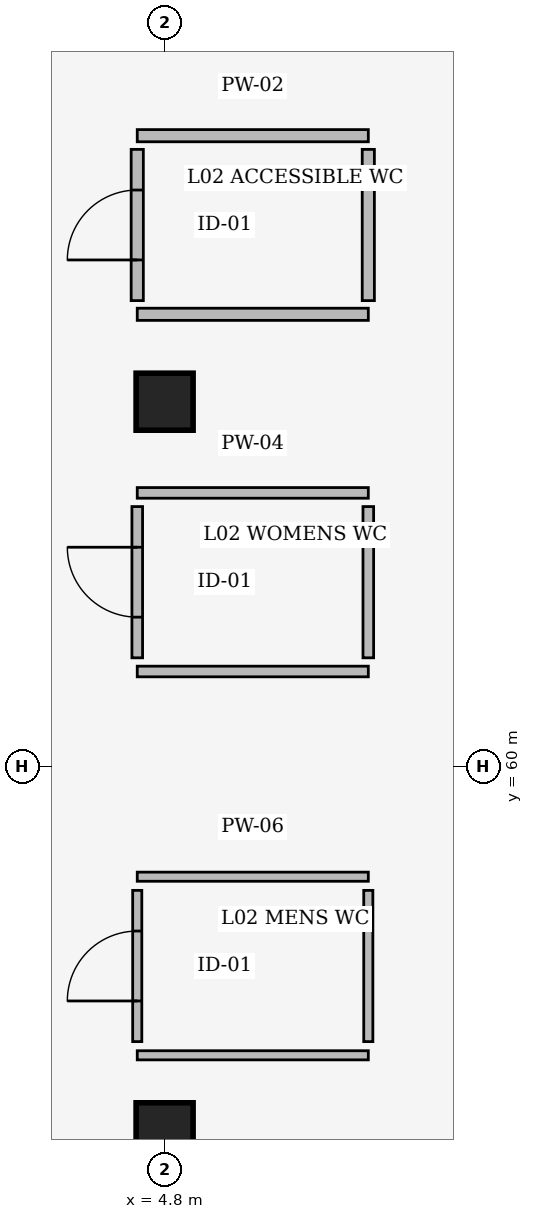
"""IFC4 building model, lengths in metres.
Left out: names, types, materials, properties, quantities, classifications, styles, units other than length and angle.
Written with IfcOpenShell. Run it as: python <this file> out.ifc"""

import sys

from ifc_helpers import new_model, si_unit, direction, frame, frame_2d, origin, origin_2d, place, context, subcontext, project, spatial, rectangle, extrude, element, fill, save


model = new_model("IFC4")
c1 = context("Model", 3, precision=1e-05, world=origin(), true_north=direction((0.0, 1.0)))
c2 = subcontext(c1, "Body", "Model", "MODEL_VIEW")
j1 = project(units=[si_unit("LENGTHUNIT", "METRE"), si_unit("PLANEANGLEUNIT", "RADIAN")], contexts=[c1])
p1 = place(None, origin())
s1 = spatial("IfcSite", under=j1, at=p1, CompositionType="ELEMENT")
p2 = place(p1, origin())
s2 = spatial("IfcBuilding", under=s1, at=p2, CompositionType="ELEMENT")
p3 = place(p2, frame((0.0, 0.0, 10.5)))
s3 = spatial("IfcBuildingStorey", under=s2, at=p3, CompositionType="ELEMENT", Elevation=10.5)
for number, where, z_axis, x_axis in (
    (1, (4.8, 55.2, 0.0), (0.0, 0.0, 1.0), (1.0, 0.0, 0.0)),
    (2, (4.8, 64.8, 0.0), (0.0, 0.0, 1.0), (1.0, 0.0, 0.0)),
):
    element("IfcColumn", number, at=place(p3, frame(where, z_axis=z_axis, x_axis=x_axis)), inside=s3, PredefinedType="COLUMN", context=c2, shape_type="SweptSolid", body=[
        extrude(rectangle(XDim=0.75, YDim=0.75, at=origin_2d()), origin(), (0.0, 0.0, 1.0), 4.8),
    ])
for number, where, z_axis, x_axis in (
    (3, (4.44, 58.55, 0.0), (0.0, 0.0, 1.0), (1.0, 0.0, 0.0)),
    (4, (4.44, 56.2, 0.0), (0.0, 0.0, 1.0), (1.0, 0.0, 0.0)),
):
    element("IfcWall", number, at=place(p3, frame(where, z_axis=z_axis, x_axis=x_axis)), inside=s3, PredefinedType="PARTITIONING", context=c2, shape_type="SweptSolid", body=[
        extrude(rectangle(XDim=3.04, YDim=0.12, at=frame_2d((1.52, 0.0))), origin(), (0.0, 0.0, 1.0), 3.897),
    ])
p4 = place(p3, frame((4.44, 56.38, 0.0), z_axis=(0.0, 0.0, 1.0), x_axis=(0.0, 1.0, 0.0)))
e5 = element("IfcWall", 5, at=p4, inside=s3, PredefinedType="PARTITIONING", context=c2, shape_type="SweptSolid", body=[
    extrude(rectangle(XDim=1.99, YDim=0.12, at=frame_2d((0.995, 0.0))), origin(), (0.0, 0.0, 1.0), 3.897),
])
p5 = place(p4, frame((0.535, 0.0, 0.0)))
e6 = element("IfcOpeningElement", 6, at=p5, cuts=e5, PredefinedType="OPENING", context=c2, shape_type="SweptSolid", body=[
    extrude(rectangle(XDim=0.92, YDim=2.12, at=frame_2d((0.46, 1.06))), frame((0.0, 0.07, 0.0), z_axis=(0.0, -1.0, 0.0), x_axis=(1.0, 0.0, 0.0)), (0.0, 0.0, 1.0), 0.14),
])
p6 = place(p3, frame((7.48, 56.38, 0.0), z_axis=(0.0, 0.0, 1.0), x_axis=(0.0, 1.0, 0.0)))
e7 = element("IfcWall", 7, at=p6, inside=s3, PredefinedType="PARTITIONING", context=c2, shape_type="SweptSolid", body=[
    extrude(rectangle(XDim=1.99, YDim=0.12, at=frame_2d((0.995, 0.0))), origin(), (0.0, 0.0, 1.0), 4.44),
])
for number, where, z_axis, x_axis in (
    (8, (4.44, 63.6, 0.0), (0.0, 0.0, 1.0), (1.0, 0.0, 0.0)),
    (9, (4.44, 61.25, 0.0), (0.0, 0.0, 1.0), (1.0, 0.0, 0.0)),
):
    element("IfcWall", number, at=place(p3, frame(where, z_axis=z_axis, x_axis=x_axis)), inside=s3, PredefinedType="PARTITIONING", context=c2, shape_type="SweptSolid", body=[
        extrude(rectangle(XDim=3.04, YDim=0.14, at=frame_2d((1.52, 0.0))), origin(), (0.0, 0.0, 1.0), 3.897),
    ])
p7 = place(p3, frame((4.44, 61.43, 0.0), z_axis=(0.0, 0.0, 1.0), x_axis=(0.0, 1.0, 0.0)))
e10 = element("IfcWall", 10, at=p7, inside=s3, PredefinedType="PARTITIONING", context=c2, shape_type="SweptSolid", body=[
    extrude(rectangle(XDim=1.99, YDim=0.14, at=frame_2d((0.995, 0.0))), origin(), (0.0, 0.0, 1.0), 3.897),
])
p8 = place(p7, frame((0.535, 0.0, 0.0)))
e11 = element("IfcOpeningElement", 11, at=p8, cuts=e10, PredefinedType="OPENING", context=c2, shape_type="SweptSolid", body=[
    extrude(rectangle(XDim=0.92, YDim=2.12, at=frame_2d((0.46, 1.06))), frame((0.0, 0.08, 0.0), z_axis=(0.0, -1.0, 0.0), x_axis=(1.0, 0.0, 0.0)), (0.0, 0.0, 1.0), 0.16),
])
p9 = place(p3, frame((7.48, 61.43, 0.0), z_axis=(0.0, 0.0, 1.0), x_axis=(0.0, 1.0, 0.0)))
e12 = element("IfcWall", 12, at=p9, inside=s3, PredefinedType="PARTITIONING", context=c2, shape_type="SweptSolid", body=[
    extrude(rectangle(XDim=1.99, YDim=0.14, at=frame_2d((0.995, 0.0))), origin(), (0.0, 0.0, 1.0), 4.44),
])
for number, where, z_axis, x_axis in (
    (13, (4.44, 68.3, 0.0), (0.0, 0.0, 1.0), (1.0, 0.0, 0.0)),
    (14, (4.44, 65.95, 0.0), (0.0, 0.0, 1.0), (1.0, 0.0, 0.0)),
):
    element("IfcWall", number, at=place(p3, frame(where, z_axis=z_axis, x_axis=x_axis)), inside=s3, PredefinedType="PARTITIONING", context=c2, shape_type="SweptSolid", body=[
        extrude(rectangle(XDim=3.04, YDim=0.16, at=frame_2d((1.52, 0.0))), origin(), (0.0, 0.0, 1.0), 3.755),
    ])
p10 = place(p3, frame((4.44, 66.13, 0.0), z_axis=(0.0, 0.0, 1.0), x_axis=(0.0, 1.0, 0.0)))
e15 = element("IfcWall", 15, at=p10, inside=s3, PredefinedType="PARTITIONING", context=c2, shape_type="SweptSolid", body=[
    extrude(rectangle(XDim=1.99, YDim=0.16, at=frame_2d((0.995, 0.0))), origin(), (0.0, 0.0, 1.0), 3.755),
])
p11 = place(p10, frame((0.535, 0.0, 0.0)))
e16 = element("IfcOpeningElement", 16, at=p11, cuts=e15, PredefinedType="OPENING", context=c2, shape_type="SweptSolid", body=[
    extrude(rectangle(XDim=0.92, YDim=2.12, at=frame_2d((0.46, 1.06))), frame((0.0, 0.09, 0.0), z_axis=(0.0, -1.0, 0.0), x_axis=(1.0, 0.0, 0.0)), (0.0, 0.0, 1.0), 0.18),
])
p12 = place(p3, frame((7.48, 66.13, 0.0), z_axis=(0.0, 0.0, 1.0), x_axis=(0.0, 1.0, 0.0)))
e17 = element("IfcWall", 17, at=p12, inside=s3, PredefinedType="PARTITIONING", context=c2, shape_type="SweptSolid", body=[
    extrude(rectangle(XDim=1.99, YDim=0.16, at=frame_2d((0.995, 0.0))), origin(), (0.0, 0.0, 1.0), 4.44),
])
p13 = place(p5, origin())
e18 = element("IfcDoor", 18, at=p13, inside=s3, OperationType="SINGLE_SWING_LEFT", PredefinedType="DOOR", context=c2, shape_type="SweptSolid", body=[
    extrude(rectangle(XDim=0.92, YDim=2.12, at=frame_2d((0.46, 1.06))), frame((0.0, 0.025, 0.0), z_axis=(0.0, -1.0, 0.0), x_axis=(1.0, 0.0, 0.0)), (0.0, 0.0, 1.0), 0.05),
])
fill(e6, e18)
p14 = place(p8, origin())
e19 = element("IfcDoor", 19, at=p14, inside=s3, OperationType="SINGLE_SWING_RIGHT", PredefinedType="DOOR", context=c2, shape_type="SweptSolid", body=[
    extrude(rectangle(XDim=0.92, YDim=2.12, at=frame_2d((0.46, 1.06))), frame((0.0, 0.025, 0.0), z_axis=(0.0, -1.0, 0.0), x_axis=(1.0, 0.0, 0.0)), (0.0, 0.0, 1.0), 0.05),
])
fill(e11, e19)
p15 = place(p11, origin())
e20 = element("IfcDoor", 20, at=p15, inside=s3, OperationType="SINGLE_SWING_LEFT", PredefinedType="DOOR", context=c2, shape_type="SweptSolid", body=[
    extrude(rectangle(XDim=0.92, YDim=2.12, at=frame_2d((0.46, 1.06))), frame((0.0, 0.025, 0.0), z_axis=(0.0, -1.0, 0.0), x_axis=(1.0, 0.0, 0.0)), (0.0, 0.0, 1.0), 0.05),
])
fill(e16, e20)
save(model, sys.argv[1])
